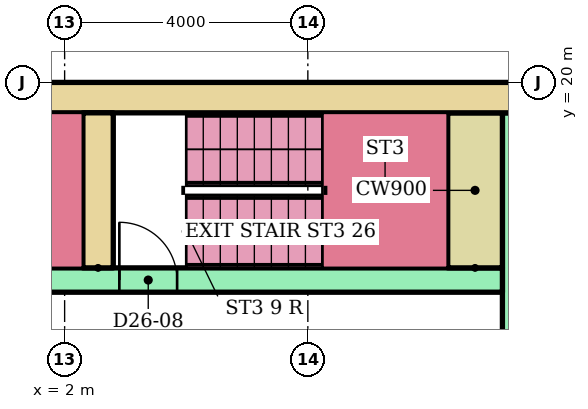
"""IFC4 building model, lengths in metres.
Left out: names, types, materials, properties, quantities, classifications, styles, units other than length and angle.
Written with IfcOpenShell. Run it as: python <this file> out.ifc"""

import sys

from ifc_helpers import new_model, si_unit, direction, frame, frame_2d, origin, place, context, subcontext, project, spatial, rectangle, extrude, element, fill, save


model = new_model("IFC4")
c1 = context("Model", 3, precision=1e-05, world=origin(), true_north=direction((0.0, 1.0)))
c2 = subcontext(c1, "Body", "Model", "MODEL_VIEW")
j1 = project(units=[si_unit("LENGTHUNIT", "METRE"), si_unit("PLANEANGLEUNIT", "RADIAN")], contexts=[c1])
p1 = place(None, origin())
s1 = spatial("IfcSite", under=j1, at=p1, CompositionType="ELEMENT")
p2 = place(p1, origin())
s2 = spatial("IfcBuilding", under=s1, at=p2, CompositionType="ELEMENT")
p3 = place(p2, frame((0.0, 0.0, 99.9)))
s3 = spatial("IfcBuildingStorey", under=s2, at=p3, CompositionType="ELEMENT", Elevation=99.9)
p4 = place(p3, frame((-13.5, 19.75, 0.0)))
e1 = element("IfcWall", 1, at=p4, inside=s3, PredefinedType="SHEAR", context=c2, shape_type="SweptSolid", body=[
    extrude(rectangle(XDim=27.0, YDim=0.5, at=frame_2d((13.5, 0.0))), origin(), (0.0, 0.0, 1.0), 2.92),
])
p5 = place(p3, frame((9.4, 6.8, 0.0), z_axis=(0.0, 0.0, 1.0), x_axis=(0.0, 1.0, 0.0)))
e2 = element("IfcWall", 2, at=p5, inside=s3, PredefinedType="SHEAR", context=c2, shape_type="SweptSolid", body=[
    extrude(rectangle(XDim=12.7, YDim=0.4, at=frame_2d((6.35, 0.0))), origin(), (0.0, 0.0, 1.0), 2.92),
])
p6 = place(p5, frame((0.3, 0.0, 0.0)))
e3 = element("IfcOpeningElement", 3, at=p6, cuts=e2, PredefinedType="OPENING", context=c2, shape_type="SweptSolid", body=[
    extrude(rectangle(XDim=1.0, YDim=2.1, at=frame_2d((0.5, 1.05))), frame((0.0, 0.21, 0.0), z_axis=(0.0, -1.0, 0.0), x_axis=(1.0, 0.0, 0.0)), (0.0, 0.0, 1.0), 0.42),
])
p7 = place(p5, frame((2.05, 0.0, 0.0)))
e4 = element("IfcOpeningElement", 4, at=p7, cuts=e2, PredefinedType="OPENING", context=c2, shape_type="SweptSolid", body=[
    extrude(rectangle(XDim=1.0, YDim=2.1, at=frame_2d((0.5, 1.05))), frame((0.0, 0.21, 0.0), z_axis=(0.0, -1.0, 0.0), x_axis=(1.0, 0.0, 0.0)), (0.0, 0.0, 1.0), 0.42),
])
p8 = place(p5, frame((7.925, 0.0, 0.0)))
e5 = element("IfcOpeningElement", 5, at=p8, cuts=e2, PredefinedType="OPENING", context=c2, shape_type="SweptSolid", body=[
    extrude(rectangle(XDim=1.0, YDim=2.1, at=frame_2d((0.5, 1.05))), frame((0.0, 0.21, 0.0), z_axis=(0.0, -1.0, 0.0), x_axis=(1.0, 0.0, 0.0)), (0.0, 0.0, 1.0), 0.42),
])
p9 = place(p3, frame((-9.2, 16.75, 0.0)))
e6 = element("IfcWall", 6, at=p9, inside=s3, PredefinedType="SHEAR", context=c2, shape_type="SweptSolid", body=[
    extrude(rectangle(XDim=18.4, YDim=0.4, at=frame_2d((9.2, 0.0))), origin(), (0.0, 0.0, 1.0), 2.92),
])
p10 = place(p9, frame((0.1, 0.0, 0.0)))
e7 = element("IfcOpeningElement", 7, at=p10, cuts=e6, PredefinedType="OPENING", context=c2, shape_type="SweptSolid", body=[
    extrude(rectangle(XDim=0.95, YDim=2.1, at=frame_2d((0.475, 1.05))), frame((0.0, 0.21, 0.0), z_axis=(0.0, -1.0, 0.0), x_axis=(1.0, 0.0, 0.0)), (0.0, 0.0, 1.0), 0.42),
])
p11 = place(p9, frame((6.1, 0.0, 0.0)))
e8 = element("IfcOpeningElement", 8, at=p11, cuts=e6, PredefinedType="OPENING", context=c2, shape_type="SweptSolid", body=[
    extrude(rectangle(XDim=0.95, YDim=2.1, at=frame_2d((0.475, 1.05))), frame((0.0, 0.21, 0.0), z_axis=(0.0, -1.0, 0.0), x_axis=(1.0, 0.0, 0.0)), (0.0, 0.0, 1.0), 0.42),
])
p12 = place(p9, frame((12.1, 0.0, 0.0)))
e9 = element("IfcOpeningElement", 9, at=p12, cuts=e6, PredefinedType="OPENING", context=c2, shape_type="SweptSolid", body=[
    extrude(rectangle(XDim=0.95, YDim=2.1, at=frame_2d((0.475, 1.05))), frame((0.0, 0.21, 0.0), z_axis=(0.0, -1.0, 0.0), x_axis=(1.0, 0.0, 0.0)), (0.0, 0.0, 1.0), 0.42),
])
p13 = place(p3, frame((2.55, 16.95, 0.0), z_axis=(0.0, 0.0, 1.0), x_axis=(0.0, 1.0, 0.0)))
e10 = element("IfcWall", 10, at=p13, inside=s3, PredefinedType="SHEAR", context=c2, shape_type="SweptSolid", body=[
    extrude(rectangle(XDim=2.55, YDim=0.5, at=frame_2d((1.275, 0.0))), origin(), (0.0, 0.0, 1.0), 2.92),
])
p14 = place(p3, frame((8.75, 16.95, 0.0), z_axis=(0.0, 0.0, 1.0), x_axis=(0.0, 1.0, 0.0)))
e11 = element("IfcWall", 11, at=p14, inside=s3, PredefinedType="SHEAR", context=c2, shape_type="SweptSolid", body=[
    extrude(rectangle(XDim=2.55, YDim=0.9, at=frame_2d((1.275, 0.0))), origin(), (0.0, 0.0, 1.0), 2.92),
])
p15 = place(p12, origin())
e12 = element("IfcDoor", 12, at=p15, inside=s3, OperationType="SINGLE_SWING_LEFT", PredefinedType="DOOR", context=c2, shape_type="SweptSolid", body=[
    extrude(rectangle(XDim=0.95, YDim=2.1, at=frame_2d((0.475, 1.05))), frame((0.0, 0.025, 0.0), z_axis=(0.0, -1.0, 0.0), x_axis=(1.0, 0.0, 0.0)), (0.0, 0.0, 1.0), 0.05),
])
fill(e9, e12)
save(model, sys.argv[1])
